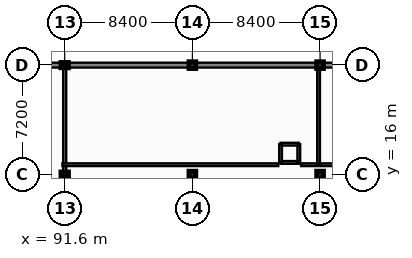
"""IFC4 building model, lengths in metres.
Left out: names, types, materials, properties, quantities, classifications, styles, units other than length and angle.
Written with IfcOpenShell. Run it as: python <this file> out.ifc"""

import sys

from ifc_helpers import new_model, si_unit, direction, frame, frame_2d, origin, origin_2d, place, context, subcontext, project, spatial, rectangle, extrude, element, fill, save


model = new_model("IFC4")
c1 = context("Model", 3, precision=1e-05, world=origin(), true_north=direction((0.0, 1.0)))
c2 = subcontext(c1, "Body", "Model", "MODEL_VIEW")
j1 = project(units=[si_unit("LENGTHUNIT", "METRE"), si_unit("PLANEANGLEUNIT", "RADIAN")], contexts=[c1])
p1 = place(None, origin())
s1 = spatial("IfcSite", under=j1, at=p1, CompositionType="ELEMENT")
p2 = place(p1, origin())
s2 = spatial("IfcBuilding", under=s1, at=p2, CompositionType="ELEMENT")
p3 = place(p2, origin())
s3 = spatial("IfcBuildingStorey", under=s2, at=p3, CompositionType="ELEMENT", Elevation=0.0)
for number, where, z_axis, x_axis in (
    (1, (91.6, 16.0, 0.0), (0.0, 0.0, 1.0), (1.0, 0.0, 0.0)),
    (2, (91.6, 23.2, 0.0), (0.0, 0.0, 1.0), (1.0, 0.0, 0.0)),
):
    element("IfcColumn", number, at=place(p3, frame(where, z_axis=z_axis, x_axis=x_axis)), inside=s3, PredefinedType="PILASTER", context=c2, shape_type="SweptSolid", body=[
        extrude(rectangle(XDim=0.5, YDim=0.35, at=origin_2d()), origin(), (0.0, 0.0, 1.0), 5.4),
    ])
for number, where, z_axis, x_axis in (
    (3, (100.0, 16.0, 0.0), (0.0, 0.0, 1.0), (1.0, 0.0, 0.0)),
    (4, (100.0, 23.2, 0.0), (0.0, 0.0, 1.0), (1.0, 0.0, 0.0)),
    (5, (108.4, 16.0, 0.0), (0.0, 0.0, 1.0), (1.0, 0.0, 0.0)),
    (6, (108.4, 23.2, 0.0), (0.0, 0.0, 1.0), (1.0, 0.0, 0.0)),
):
    element("IfcColumn", number, at=place(p3, frame(where, z_axis=z_axis, x_axis=x_axis)), inside=s3, PredefinedType="COLUMN", context=c2, shape_type="SweptSolid", body=[
        extrude(rectangle(XDim=0.45, YDim=0.45, at=origin_2d()), origin(), (0.0, 0.0, 1.0), 5.4),
    ])
p4 = place(p3, frame((91.6, 8.95, 0.0), z_axis=(0.0, 0.0, 1.0), x_axis=(0.0, 1.0, 0.0)))
e7 = element("IfcWall", 7, at=p4, inside=s3, PredefinedType="PARTITIONING", context=c2, shape_type="SweptSolid", body=[
    extrude(rectangle(XDim=14.1, YDim=0.2, at=frame_2d((7.05, 0.0))), origin(), (0.0, 0.0, 1.0), 3.99),
])
p5 = place(p4, frame((3.936, 0.0, -0.01)))
e8 = element("IfcOpeningElement", 8, at=p5, cuts=e7, PredefinedType="OPENING", context=c2, shape_type="SweptSolid", body=[
    extrude(rectangle(XDim=1.8, YDim=2.26, at=frame_2d((0.9, 1.13))), frame((0.0, 0.11, 0.0), z_axis=(0.0, -1.0, 0.0), x_axis=(1.0, 0.0, 0.0)), (0.0, 0.0, 1.0), 0.22),
])
p6 = place(p3, frame((91.45, 16.65, 0.0), z_axis=(0.0, 0.0, 1.0), x_axis=(1.0, 0.0, 0.0)))
e9 = element("IfcWall", 9, at=p6, inside=s3, PredefinedType="PARTITIONING", context=c2, shape_type="SweptSolid", body=[
    extrude(rectangle(XDim=14.2, YDim=0.18, at=frame_2d((7.1, 0.0))), origin(), (0.0, 0.0, 1.0), 4.64),
])
p7 = place(p6, frame((5.67, 0.0, -0.01)))
e10 = element("IfcOpeningElement", 10, at=p7, cuts=e9, PredefinedType="OPENING", context=c2, shape_type="SweptSolid", body=[
    extrude(rectangle(XDim=1.6, YDim=2.21, at=frame_2d((0.8, 1.105))), frame((0.0, 0.1, 0.0), z_axis=(0.0, -1.0, 0.0), x_axis=(1.0, 0.0, 0.0)), (0.0, 0.0, 1.0), 0.2),
])
p8 = place(p3, frame((107.15, 16.65, 0.0), z_axis=(0.0, 0.0, 1.0), x_axis=(1.0, 0.0, 0.0)))
e11 = element("IfcWall", 11, at=p8, inside=s3, PredefinedType="PARTITIONING", context=c2, shape_type="SweptSolid", body=[
    extrude(rectangle(XDim=5.15, YDim=0.18, at=frame_2d((2.575, 0.0))), origin(), (0.0, 0.0, 1.0), 4.64),
])
p9 = place(p8, frame((2.697, 0.0, -0.01)))
e12 = element("IfcOpeningElement", 12, at=p9, cuts=e11, PredefinedType="OPENING", context=c2, shape_type="SweptSolid", body=[
    extrude(rectangle(XDim=1.0, YDim=2.16, at=frame_2d((0.5, 1.08))), frame((0.0, 0.1, 0.0), z_axis=(0.0, -1.0, 0.0), x_axis=(1.0, 0.0, 0.0)), (0.0, 0.0, 1.0), 0.2),
])
p10 = place(p3, frame((108.3, 16.65, 0.0), z_axis=(0.0, 0.0, 1.0), x_axis=(0.0, 1.0, 0.0)))
e13 = element("IfcWall", 13, at=p10, inside=s3, PredefinedType="PARTITIONING", context=c2, shape_type="SweptSolid", body=[
    extrude(rectangle(XDim=6.4, YDim=0.18, at=frame_2d((3.2, 0.0))), origin(), (0.0, 0.0, 1.0), 4.64),
])
p11 = place(p3, frame((100.0, 23.2, 0.0), z_axis=(0.0, 0.0, 1.0), x_axis=(-1.0, 0.0, 0.0)))
e14 = element("IfcWall", 14, at=p11, inside=s3, PredefinedType="SOLIDWALL", context=c2, shape_type="SweptSolid", body=[
    extrude(rectangle(XDim=8.4, YDim=0.32, at=frame_2d((4.2, 0.0))), origin(), (0.0, 0.0, 1.0), 3.99),
])
p12 = place(p11, frame((0.46, 0.0, 0.9)))
e15 = element("IfcOpeningElement", 15, at=p12, cuts=e14, PredefinedType="OPENING", context=c2, shape_type="SweptSolid", body=[
    extrude(rectangle(XDim=2.4, YDim=2.35, at=frame_2d((1.2, 1.175))), frame((0.0, 0.17, 0.0), z_axis=(0.0, -1.0, 0.0), x_axis=(1.0, 0.0, 0.0)), (0.0, 0.0, 1.0), 0.34),
])
p13 = place(p11, frame((5.46, 0.0, 0.9)))
e16 = element("IfcOpeningElement", 16, at=p13, cuts=e14, PredefinedType="OPENING", context=c2, shape_type="SweptSolid", body=[
    extrude(rectangle(XDim=2.4, YDim=2.35, at=frame_2d((1.2, 1.175))), frame((0.0, 0.17, 0.0), z_axis=(0.0, -1.0, 0.0), x_axis=(1.0, 0.0, 0.0)), (0.0, 0.0, 1.0), 0.34),
])
p14 = place(p3, frame((108.4, 23.2, 0.0), z_axis=(0.0, 0.0, 1.0), x_axis=(-1.0, 0.0, 0.0)))
e17 = element("IfcWall", 17, at=p14, inside=s3, PredefinedType="SOLIDWALL", context=c2, shape_type="SweptSolid", body=[
    extrude(rectangle(XDim=8.4, YDim=0.32, at=frame_2d((4.2, 0.0))), origin(), (0.0, 0.0, 1.0), 4.64),
])
p15 = place(p14, frame((0.46, 0.0, 0.9)))
e18 = element("IfcOpeningElement", 18, at=p15, cuts=e17, PredefinedType="OPENING", context=c2, shape_type="SweptSolid", body=[
    extrude(rectangle(XDim=2.4, YDim=2.35, at=frame_2d((1.2, 1.175))), frame((0.0, 0.17, 0.0), z_axis=(0.0, -1.0, 0.0), x_axis=(1.0, 0.0, 0.0)), (0.0, 0.0, 1.0), 0.34),
])
p16 = place(p14, frame((5.46, 0.0, 0.9)))
e19 = element("IfcOpeningElement", 19, at=p16, cuts=e17, PredefinedType="OPENING", context=c2, shape_type="SweptSolid", body=[
    extrude(rectangle(XDim=2.4, YDim=2.35, at=frame_2d((1.2, 1.175))), frame((0.0, 0.17, 0.0), z_axis=(0.0, -1.0, 0.0), x_axis=(1.0, 0.0, 0.0)), (0.0, 0.0, 1.0), 0.34),
])
p17 = place(p3, frame((116.8, 23.2, 0.0), z_axis=(0.0, 0.0, 1.0), x_axis=(-1.0, 0.0, 0.0)))
e20 = element("IfcWall", 20, at=p17, inside=s3, PredefinedType="SOLIDWALL", context=c2, shape_type="SweptSolid", body=[
    extrude(rectangle(XDim=8.4, YDim=0.32, at=frame_2d((4.2, 0.0))), origin(), (0.0, 0.0, 1.0), 3.99),
])
p18 = place(p17, frame((0.46, 0.0, 0.9)))
e21 = element("IfcOpeningElement", 21, at=p18, cuts=e20, PredefinedType="OPENING", context=c2, shape_type="SweptSolid", body=[
    extrude(rectangle(XDim=2.4, YDim=2.35, at=frame_2d((1.2, 1.175))), frame((0.0, 0.17, 0.0), z_axis=(0.0, -1.0, 0.0), x_axis=(1.0, 0.0, 0.0)), (0.0, 0.0, 1.0), 0.34),
])
p19 = place(p17, frame((5.46, 0.0, 0.9)))
e22 = element("IfcOpeningElement", 22, at=p19, cuts=e20, PredefinedType="OPENING", context=c2, shape_type="SweptSolid", body=[
    extrude(rectangle(XDim=2.4, YDim=2.35, at=frame_2d((1.2, 1.175))), frame((0.0, 0.17, 0.0), z_axis=(0.0, -1.0, 0.0), x_axis=(1.0, 0.0, 0.0)), (0.0, 0.0, 1.0), 0.34),
])
p20 = place(p3, frame((91.6, 23.2, 0.0), z_axis=(0.0, 0.0, 1.0), x_axis=(-1.0, 0.0, 0.0)))
e23 = element("IfcWall", 23, at=p20, inside=s3, PredefinedType="SOLIDWALL", context=c2, shape_type="SweptSolid", body=[
    extrude(rectangle(XDim=4.8, YDim=0.32, at=frame_2d((2.4, 0.0))), origin(), (0.0, 0.0, 1.0), 3.99),
])
p21 = place(p20, frame((1.46, 0.0, 0.9)))
e24 = element("IfcOpeningElement", 24, at=p21, cuts=e23, PredefinedType="OPENING", context=c2, shape_type="SweptSolid", body=[
    extrude(rectangle(XDim=1.8, YDim=2.2, at=frame_2d((0.9, 1.1))), frame((0.0, 0.17, 0.0), z_axis=(0.0, -1.0, 0.0), x_axis=(1.0, 0.0, 0.0)), (0.0, 0.0, 1.0), 0.34),
])
p22 = place(p3, frame((105.8, 16.8, 0.0), z_axis=(0.0, 0.0, 1.0), x_axis=(1.0, 0.0, 0.0)))
e25 = element("IfcWall", 25, at=p22, inside=s3, PredefinedType="SOLIDWALL", context=c2, shape_type="SweptSolid", body=[
    extrude(rectangle(XDim=1.2, YDim=0.18, at=frame_2d((0.6, 0.0))), origin(), (0.0, 0.0, 1.0), 5.07),
])
p23 = place(p22, frame((0.2, 0.0, -0.01)))
e26 = element("IfcOpeningElement", 26, at=p23, cuts=e25, PredefinedType="OPENING", context=c2, shape_type="SweptSolid", body=[
    extrude(rectangle(XDim=0.8, YDim=2.06, at=frame_2d((0.4, 1.03))), frame((0.0, 0.1, 0.0), z_axis=(0.0, -1.0, 0.0), x_axis=(1.0, 0.0, 0.0)), (0.0, 0.0, 1.0), 0.2),
])
for number, where, z_axis, x_axis in (
    (27, (107.0, 16.8, 0.0), (0.0, 0.0, 1.0), (0.0, 1.0, 0.0)),
    (28, (107.0, 18.0, 0.0), (0.0, 0.0, 1.0), (-1.0, 0.0, 0.0)),
    (29, (105.8, 18.0, 0.0), (0.0, 0.0, 1.0), (0.0, -1.0, 0.0)),
):
    element("IfcWall", number, at=place(p3, frame(where, z_axis=z_axis, x_axis=x_axis)), inside=s3, PredefinedType="SOLIDWALL", context=c2, shape_type="SweptSolid", body=[
        extrude(rectangle(XDim=1.2, YDim=0.18, at=frame_2d((0.6, 0.0))), origin(), (0.0, 0.0, 1.0), 5.07),
    ])
p24 = place(p7, frame((0.0, 0.0, 0.01)))
e30 = element("IfcDoor", 30, at=p24, inside=s3, OperationType="DOUBLE_SWING_LEFT", PredefinedType="DOOR", context=c2, shape_type="SweptSolid", body=[
    extrude(rectangle(XDim=1.6, YDim=2.2, at=frame_2d((0.8, 1.1))), frame((0.0, 0.025, 0.0), z_axis=(0.0, -1.0, 0.0), x_axis=(1.0, 0.0, 0.0)), (0.0, 0.0, 1.0), 0.05),
])
fill(e10, e30)
p25 = place(p12, origin())
e31 = element("IfcWindow", 31, at=p25, inside=s3, PartitioningType="TRIPLE_PANEL_VERTICAL", PredefinedType="WINDOW", context=c2, shape_type="SweptSolid", body=[
    extrude(rectangle(XDim=2.4, YDim=2.35, at=frame_2d((1.2, 1.175))), frame((0.0, 0.03, 0.0), z_axis=(0.0, -1.0, 0.0), x_axis=(1.0, 0.0, 0.0)), (0.0, 0.0, 1.0), 0.06),
])
fill(e15, e31)
p26 = place(p13, origin())
e32 = element("IfcWindow", 32, at=p26, inside=s3, PartitioningType="TRIPLE_PANEL_VERTICAL", PredefinedType="WINDOW", context=c2, shape_type="SweptSolid", body=[
    extrude(rectangle(XDim=2.4, YDim=2.35, at=frame_2d((1.2, 1.175))), frame((0.0, 0.03, 0.0), z_axis=(0.0, -1.0, 0.0), x_axis=(1.0, 0.0, 0.0)), (0.0, 0.0, 1.0), 0.06),
])
fill(e16, e32)
p27 = place(p15, origin())
e33 = element("IfcWindow", 33, at=p27, inside=s3, PartitioningType="TRIPLE_PANEL_VERTICAL", PredefinedType="WINDOW", context=c2, shape_type="SweptSolid", body=[
    extrude(rectangle(XDim=2.4, YDim=2.35, at=frame_2d((1.2, 1.175))), frame((0.0, 0.03, 0.0), z_axis=(0.0, -1.0, 0.0), x_axis=(1.0, 0.0, 0.0)), (0.0, 0.0, 1.0), 0.06),
])
fill(e18, e33)
p28 = place(p16, origin())
e34 = element("IfcWindow", 34, at=p28, inside=s3, PartitioningType="TRIPLE_PANEL_VERTICAL", PredefinedType="WINDOW", context=c2, shape_type="SweptSolid", body=[
    extrude(rectangle(XDim=2.4, YDim=2.35, at=frame_2d((1.2, 1.175))), frame((0.0, 0.03, 0.0), z_axis=(0.0, -1.0, 0.0), x_axis=(1.0, 0.0, 0.0)), (0.0, 0.0, 1.0), 0.06),
])
fill(e19, e34)
p29 = place(p19, origin())
e35 = element("IfcWindow", 35, at=p29, inside=s3, PartitioningType="TRIPLE_PANEL_VERTICAL", PredefinedType="WINDOW", context=c2, shape_type="SweptSolid", body=[
    extrude(rectangle(XDim=2.4, YDim=2.35, at=frame_2d((1.2, 1.175))), frame((0.0, 0.03, 0.0), z_axis=(0.0, -1.0, 0.0), x_axis=(1.0, 0.0, 0.0)), (0.0, 0.0, 1.0), 0.06),
])
fill(e22, e35)
p30 = place(p23, frame((0.0, 0.0, 0.01)))
e36 = element("IfcDoor", 36, at=p30, inside=s3, OperationType="SINGLE_SWING_LEFT", PredefinedType="DOOR", context=c2, shape_type="SweptSolid", body=[
    extrude(rectangle(XDim=0.8, YDim=2.05, at=frame_2d((0.4, 1.025))), frame((0.0, 0.025, 0.0), z_axis=(0.0, -1.0, 0.0), x_axis=(1.0, 0.0, 0.0)), (0.0, 0.0, 1.0), 0.05),
])
fill(e26, e36)
save(model, sys.argv[1])
